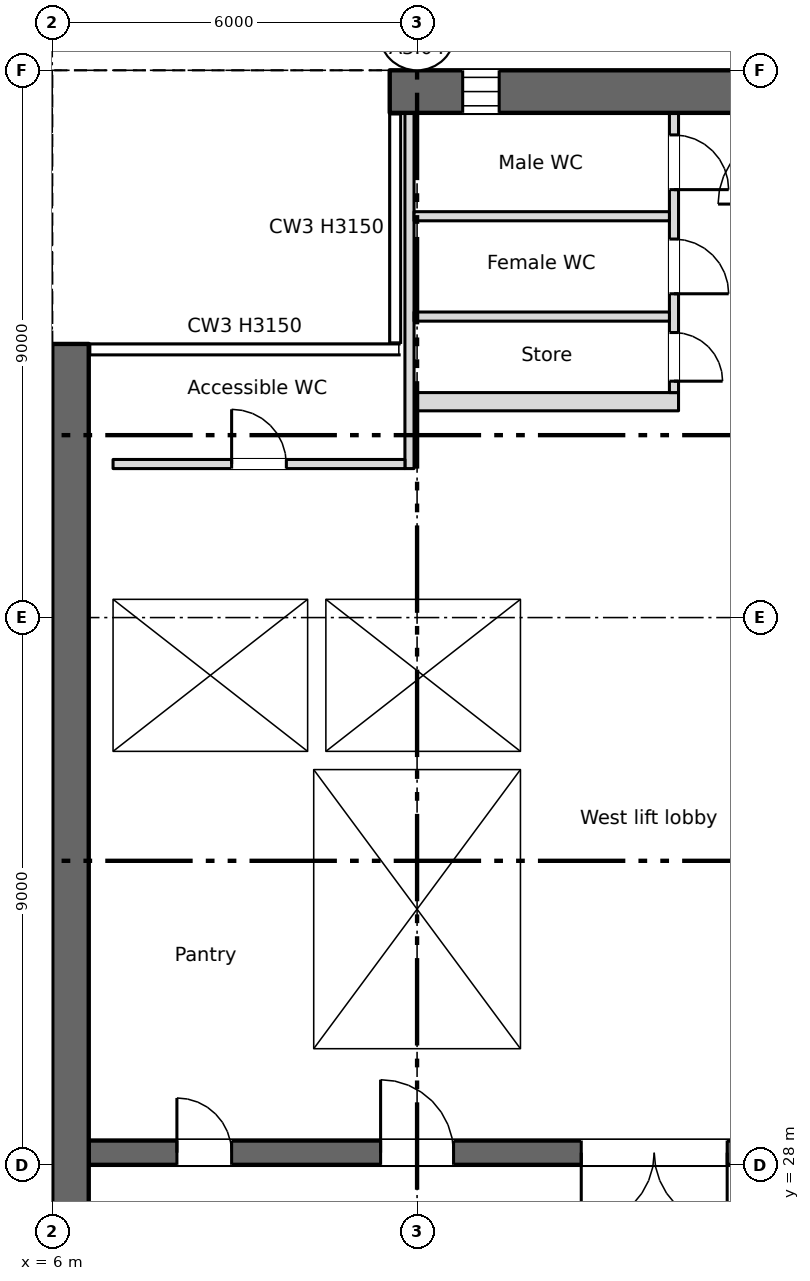
"""IFC4 building model, lengths in metres.
Left out: names, types, materials, properties, quantities, classifications, styles, units other than length and angle.
Written with IfcOpenShell. Run it as: python <this file> out.ifc"""

import sys

from ifc_helpers import new_model, si_unit, direction, frame, frame_2d, origin, place, context, subcontext, project, spatial, rectangle, extrude, element, fill, save


model = new_model("IFC4")
c1 = context("Model", 3, precision=1e-05, world=origin(), true_north=direction((0.0, 1.0)))
c2 = subcontext(c1, "Body", "Model", "MODEL_VIEW")
j1 = project(units=[si_unit("LENGTHUNIT", "METRE"), si_unit("PLANEANGLEUNIT", "RADIAN")], contexts=[c1])
p1 = place(None, origin())
s1 = spatial("IfcSite", under=j1, at=p1, CompositionType="ELEMENT")
p2 = place(p1, origin())
s2 = spatial("IfcBuilding", under=s1, at=p2, CompositionType="ELEMENT")
p3 = place(p2, frame((0.0, 0.0, 223.0)))
s3 = spatial("IfcBuildingStorey", under=s2, at=p3, CompositionType="ELEMENT", Elevation=223.0)
p4 = place(p3, frame((6.3, 7.5, 0.0), z_axis=(0.0, 0.0, 1.0), x_axis=(0.0, 1.0, 0.0)))
e1 = element("IfcWall", 1, at=p4, inside=s3, PredefinedType="SHEAR", context=c2, shape_type="SweptSolid", body=[
    extrude(rectangle(XDim=34.0, YDim=0.6, at=frame_2d((17.0, 0.0))), origin(), (0.0, 0.0, 1.0), 3.15),
])
p5 = place(p4, frame((1.2, 0.0, 0.6)))
e2 = element("IfcOpeningElement", 2, at=p5, cuts=e1, PredefinedType="OPENING", context=c2, shape_type="SweptSolid", body=[
    extrude(rectangle(XDim=0.6, YDim=2.4, at=frame_2d((0.3, 1.2))), frame((0.0, 0.31, 0.0), z_axis=(0.0, -1.0, 0.0), x_axis=(1.0, 0.0, 0.0)), (0.0, 0.0, 1.0), 0.62),
])
p6 = place(p4, frame((7.2, 0.0, 0.6)))
e3 = element("IfcOpeningElement", 3, at=p6, cuts=e1, PredefinedType="OPENING", context=c2, shape_type="SweptSolid", body=[
    extrude(rectangle(XDim=0.6, YDim=2.4, at=frame_2d((0.3, 1.2))), frame((0.0, 0.31, 0.0), z_axis=(0.0, -1.0, 0.0), x_axis=(1.0, 0.0, 0.0)), (0.0, 0.0, 1.0), 0.62),
])
p7 = place(p4, frame((13.2, 0.0, 0.6)))
e4 = element("IfcOpeningElement", 4, at=p7, cuts=e1, PredefinedType="OPENING", context=c2, shape_type="SweptSolid", body=[
    extrude(rectangle(XDim=0.6, YDim=2.4, at=frame_2d((0.3, 1.2))), frame((0.0, 0.31, 0.0), z_axis=(0.0, -1.0, 0.0), x_axis=(1.0, 0.0, 0.0)), (0.0, 0.0, 1.0), 0.62),
])
p8 = place(p4, frame((19.2, 0.0, 0.6)))
e5 = element("IfcOpeningElement", 5, at=p8, cuts=e1, PredefinedType="OPENING", context=c2, shape_type="SweptSolid", body=[
    extrude(rectangle(XDim=0.6, YDim=2.4, at=frame_2d((0.3, 1.2))), frame((0.0, 0.31, 0.0), z_axis=(0.0, -1.0, 0.0), x_axis=(1.0, 0.0, 0.0)), (0.0, 0.0, 1.0), 0.62),
])
p9 = place(p3, frame((11.55, 45.65, 0.0), z_axis=(0.0, 0.0, 1.0), x_axis=(1.0, 0.0, 0.0)))
e6 = element("IfcWall", 6, at=p9, inside=s3, PredefinedType="SHEAR", context=c2, shape_type="SweptSolid", body=[
    extrude(rectangle(XDim=54.9, YDim=0.7, at=frame_2d((27.45, 0.0))), origin(), (0.0, 0.0, 1.0), 3.15),
])
p10 = place(p9, frame((1.2, 0.0, 0.6)))
e7 = element("IfcOpeningElement", 7, at=p10, cuts=e6, PredefinedType="OPENING", context=c2, shape_type="SweptSolid", body=[
    extrude(rectangle(XDim=0.6, YDim=2.4, at=frame_2d((0.3, 1.2))), frame((0.0, 0.36, 0.0), z_axis=(0.0, -1.0, 0.0), x_axis=(1.0, 0.0, 0.0)), (0.0, 0.0, 1.0), 0.72),
])
p11 = place(p3, frame((6.6, 28.2, 0.0), z_axis=(0.0, 0.0, 1.0), x_axis=(1.0, 0.0, 0.0)))
e8 = element("IfcWall", 8, at=p11, inside=s3, PredefinedType="SHEAR", context=c2, shape_type="SweptSolid", body=[
    extrude(rectangle(XDim=57.9, YDim=0.4, at=frame_2d((28.95, 0.0))), origin(), (0.0, 0.0, 1.0), 3.15),
])
p12 = place(p11, frame((12.163, 0.0, 0.0)))
e9 = element("IfcOpeningElement", 9, at=p12, cuts=e8, PredefinedType="OPENING", context=c2, shape_type="SweptSolid", body=[
    extrude(rectangle(XDim=0.9, YDim=2.1, at=frame_2d((0.45, 1.05))), frame((0.0, 0.21, 0.0), z_axis=(0.0, -1.0, 0.0), x_axis=(1.0, 0.0, 0.0)), (0.0, 0.0, 1.0), 0.42),
])
p13 = place(p11, frame((14.738, 0.0, 0.0)))
e10 = element("IfcOpeningElement", 10, at=p13, cuts=e8, PredefinedType="OPENING", context=c2, shape_type="SweptSolid", body=[
    extrude(rectangle(XDim=0.9, YDim=2.1, at=frame_2d((0.45, 1.05))), frame((0.0, 0.21, 0.0), z_axis=(0.0, -1.0, 0.0), x_axis=(1.0, 0.0, 0.0)), (0.0, 0.0, 1.0), 0.42),
])
p14 = place(p11, frame((49.163, 0.0, 0.0)))
e11 = element("IfcOpeningElement", 11, at=p14, cuts=e8, PredefinedType="OPENING", context=c2, shape_type="SweptSolid", body=[
    extrude(rectangle(XDim=0.9, YDim=2.1, at=frame_2d((0.45, 1.05))), frame((0.0, 0.21, 0.0), z_axis=(0.0, -1.0, 0.0), x_axis=(1.0, 0.0, 0.0)), (0.0, 0.0, 1.0), 0.42),
])
p15 = place(p11, frame((51.738, 0.0, 0.0)))
e12 = element("IfcOpeningElement", 12, at=p15, cuts=e8, PredefinedType="OPENING", context=c2, shape_type="SweptSolid", body=[
    extrude(rectangle(XDim=0.9, YDim=2.1, at=frame_2d((0.45, 1.05))), frame((0.0, 0.21, 0.0), z_axis=(0.0, -1.0, 0.0), x_axis=(1.0, 0.0, 0.0)), (0.0, 0.0, 1.0), 0.42),
])
p16 = place(p11, frame((1.45, 0.0, 0.0)))
e13 = element("IfcOpeningElement", 13, at=p16, cuts=e8, PredefinedType="OPENING", context=c2, shape_type="SweptSolid", body=[
    extrude(rectangle(XDim=0.9, YDim=2.1, at=frame_2d((0.45, 1.05))), frame((0.0, 0.21, 0.0), z_axis=(0.0, -1.0, 0.0), x_axis=(1.0, 0.0, 0.0)), (0.0, 0.0, 1.0), 0.42),
])
p17 = place(p11, frame((4.8, 0.0, 0.0)))
e14 = element("IfcOpeningElement", 14, at=p17, cuts=e8, PredefinedType="OPENING", context=c2, shape_type="SweptSolid", body=[
    extrude(rectangle(XDim=1.2, YDim=2.1, at=frame_2d((0.6, 1.05))), frame((0.0, 0.21, 0.0), z_axis=(0.0, -1.0, 0.0), x_axis=(1.0, 0.0, 0.0)), (0.0, 0.0, 1.0), 0.42),
])
p18 = place(p11, frame((31.8, 0.0, 0.0)))
e15 = element("IfcOpeningElement", 15, at=p18, cuts=e8, PredefinedType="OPENING", context=c2, shape_type="SweptSolid", body=[
    extrude(rectangle(XDim=1.2, YDim=2.1, at=frame_2d((0.6, 1.05))), frame((0.0, 0.21, 0.0), z_axis=(0.0, -1.0, 0.0), x_axis=(1.0, 0.0, 0.0)), (0.0, 0.0, 1.0), 0.42),
])
p19 = place(p11, frame((55.3, 0.0, 0.0)))
e16 = element("IfcOpeningElement", 16, at=p19, cuts=e8, PredefinedType="OPENING", context=c2, shape_type="SweptSolid", body=[
    extrude(rectangle(XDim=1.2, YDim=2.1, at=frame_2d((0.6, 1.05))), frame((0.0, 0.21, 0.0), z_axis=(0.0, -1.0, 0.0), x_axis=(1.0, 0.0, 0.0)), (0.0, 0.0, 1.0), 0.42),
])
p20 = place(p11, frame((21.8, 0.0, 0.0)))
e17 = element("IfcOpeningElement", 17, at=p20, cuts=e8, PredefinedType="OPENING", context=c2, shape_type="SweptSolid", body=[
    extrude(rectangle(XDim=1.2, YDim=2.1, at=frame_2d((0.6, 1.05))), frame((0.0, 0.21, 0.0), z_axis=(0.0, -1.0, 0.0), x_axis=(1.0, 0.0, 0.0)), (0.0, 0.0, 1.0), 0.42),
])
p21 = place(p11, frame((41.8, 0.0, 0.0)))
e18 = element("IfcOpeningElement", 18, at=p21, cuts=e8, PredefinedType="OPENING", context=c2, shape_type="SweptSolid", body=[
    extrude(rectangle(XDim=1.2, YDim=2.1, at=frame_2d((0.6, 1.05))), frame((0.0, 0.21, 0.0), z_axis=(0.0, -1.0, 0.0), x_axis=(1.0, 0.0, 0.0)), (0.0, 0.0, 1.0), 0.42),
])
p22 = place(p11, frame((24.95, 0.0, 0.0)))
e19 = element("IfcOpeningElement", 19, at=p22, cuts=e8, PredefinedType="OPENING", context=c2, shape_type="SweptSolid", body=[
    extrude(rectangle(XDim=2.4, YDim=2.1, at=frame_2d((1.2, 1.05))), frame((0.0, 0.21, 0.0), z_axis=(0.0, -1.0, 0.0), x_axis=(1.0, 0.0, 0.0)), (0.0, 0.0, 1.0), 0.42),
])
p23 = place(p11, frame((37.45, 0.0, 0.0)))
e20 = element("IfcOpeningElement", 20, at=p23, cuts=e8, PredefinedType="OPENING", context=c2, shape_type="SweptSolid", body=[
    extrude(rectangle(XDim=2.4, YDim=2.1, at=frame_2d((1.2, 1.05))), frame((0.0, 0.21, 0.0), z_axis=(0.0, -1.0, 0.0), x_axis=(1.0, 0.0, 0.0)), (0.0, 0.0, 1.0), 0.42),
])
p24 = place(p11, frame((8.1, 0.0, 0.0)))
e21 = element("IfcOpeningElement", 21, at=p24, cuts=e8, PredefinedType="OPENING", context=c2, shape_type="SweptSolid", body=[
    extrude(rectangle(XDim=2.4, YDim=2.1, at=frame_2d((1.2, 1.05))), frame((0.0, 0.21, 0.0), z_axis=(0.0, -1.0, 0.0), x_axis=(1.0, 0.0, 0.0)), (0.0, 0.0, 1.0), 0.42),
])
p25 = place(p11, frame((28.95, 0.0, 0.0)))
e22 = element("IfcOpeningElement", 22, at=p25, cuts=e8, PredefinedType="OPENING", context=c2, shape_type="SweptSolid", body=[
    extrude(rectangle(XDim=0.9, YDim=2.1, at=frame_2d((0.45, 1.05))), frame((0.0, 0.21, 0.0), z_axis=(0.0, -1.0, 0.0), x_axis=(1.0, 0.0, 0.0)), (0.0, 0.0, 1.0), 0.42),
])
p26 = place(p11, frame((34.95, 0.0, 0.0)))
e23 = element("IfcOpeningElement", 23, at=p26, cuts=e8, PredefinedType="OPENING", context=c2, shape_type="SweptSolid", body=[
    extrude(rectangle(XDim=0.9, YDim=2.1, at=frame_2d((0.45, 1.05))), frame((0.0, 0.21, 0.0), z_axis=(0.0, -1.0, 0.0), x_axis=(1.0, 0.0, 0.0)), (0.0, 0.0, 1.0), 0.42),
])
p27 = place(p3, frame((6.8, 28.4, 0.0), z_axis=(0.0, 0.0, 1.0), x_axis=(0.0, 1.0, 0.0)))
e24 = element("IfcWall", 24, at=p27, inside=s3, PredefinedType="SHEAR", context=c2, shape_type="SweptSolid", body=[
    extrude(rectangle(XDim=12.85, YDim=0.4, at=frame_2d((6.425, 0.0))), origin(), (0.0, 0.0, 1.0), 3.15),
])
for number, where, z_axis, x_axis in (
    (25, (10.15, 28.4, 0.0), (0.0, 0.0, 1.0), (0.0, 1.0, 0.0)),
    (26, (13.85, 28.4, 0.0), (0.0, 0.0, 1.0), (0.0, 1.0, 0.0)),
):
    element("IfcWall", number, at=place(p3, frame(where, z_axis=z_axis, x_axis=x_axis)), inside=s3, PredefinedType="SHEAR", context=c2, shape_type="SweptSolid", body=[
        extrude(rectangle(XDim=6.1, YDim=0.3, at=frame_2d((3.05, 0.0))), origin(), (0.0, 0.0, 1.0), 3.15),
    ])
for number, where, z_axis, x_axis in (
    (27, (7.0, 34.65, 0.0), (0.0, 0.0, 1.0), (1.0, 0.0, 0.0)),
    (28, (7.0, 37.45, 0.0), (0.0, 0.0, 1.0), (1.0, 0.0, 0.0)),
):
    element("IfcWall", number, at=place(p3, frame(where, z_axis=z_axis, x_axis=x_axis)), inside=s3, PredefinedType="SHEAR", context=c2, shape_type="SweptSolid", body=[
        extrude(rectangle(XDim=7.0, YDim=0.3, at=frame_2d((3.5, 0.0))), origin(), (0.0, 0.0, 1.0), 3.15),
    ])
p28 = place(p3, frame((13.85, 34.8, 0.0), z_axis=(0.0, 0.0, 1.0), x_axis=(0.0, 1.0, 0.0)))
e29 = element("IfcWall", 29, at=p28, inside=s3, PredefinedType="SHEAR", context=c2, shape_type="SweptSolid", body=[
    extrude(rectangle(XDim=2.5, YDim=0.3, at=frame_2d((1.25, 0.0))), origin(), (0.0, 0.0, 1.0), 3.15),
])
p29 = place(p3, frame((11.95, 40.55, 0.0), z_axis=(0.0, 0.0, 1.0), x_axis=(1.0, 0.0, 0.0)))
e30 = element("IfcWall", 30, at=p29, inside=s3, PredefinedType="PARTITIONING", context=c2, shape_type="SweptSolid", body=[
    extrude(rectangle(XDim=4.35, YDim=0.3, at=frame_2d((2.175, 0.0))), origin(), (0.0, 0.0, 1.0), 3.15),
])
p30 = place(p3, frame((10.35, 34.8, 0.0), z_axis=(0.0, 0.0, 1.0), x_axis=(0.0, 1.0, 0.0)))
e31 = element("IfcWall", 31, at=p30, inside=s3, PredefinedType="SHEAR", context=c2, shape_type="SweptSolid", body=[
    extrude(rectangle(XDim=2.5, YDim=0.3, at=frame_2d((1.25, 0.0))), origin(), (0.0, 0.0, 1.0), 3.15),
])
p31 = place(p3, frame((16.225, 45.3, 0.0), z_axis=(0.0, 0.0, 1.0), x_axis=(0.0, -1.0, 0.0)))
e32 = element("IfcWall", 32, at=p31, inside=s3, PredefinedType="PARTITIONING", context=c2, shape_type="SweptSolid", body=[
    extrude(rectangle(XDim=4.6, YDim=0.15, at=frame_2d((2.3, 0.0))), origin(), (0.0, 0.0, 1.0), 3.15),
])
p32 = place(p31, frame((3.613, 0.0, 0.0)))
e33 = element("IfcOpeningElement", 33, at=p32, cuts=e32, PredefinedType="OPENING", context=c2, shape_type="SweptSolid", body=[
    extrude(rectangle(XDim=0.8, YDim=2.1, at=frame_2d((0.4, 1.05))), frame((0.0, 0.085, 0.0), z_axis=(0.0, -1.0, 0.0), x_axis=(1.0, 0.0, 0.0)), (0.0, 0.0, 1.0), 0.17),
])
p33 = place(p31, frame((2.075, 0.0, 0.0)))
e34 = element("IfcOpeningElement", 34, at=p33, cuts=e32, PredefinedType="OPENING", context=c2, shape_type="SweptSolid", body=[
    extrude(rectangle(XDim=0.9, YDim=2.1, at=frame_2d((0.45, 1.05))), frame((0.0, 0.085, 0.0), z_axis=(0.0, -1.0, 0.0), x_axis=(1.0, 0.0, 0.0)), (0.0, 0.0, 1.0), 0.17),
])
p34 = place(p31, frame((0.363, 0.0, 0.0)))
e35 = element("IfcOpeningElement", 35, at=p34, cuts=e32, PredefinedType="OPENING", context=c2, shape_type="SweptSolid", body=[
    extrude(rectangle(XDim=0.9, YDim=2.1, at=frame_2d((0.45, 1.05))), frame((0.0, 0.085, 0.0), z_axis=(0.0, -1.0, 0.0), x_axis=(1.0, 0.0, 0.0)), (0.0, 0.0, 1.0), 0.17),
])
p35 = place(p3, frame((11.875, 39.45, 0.0), z_axis=(0.0, 0.0, 1.0), x_axis=(0.0, 1.0, 0.0)))
e36 = element("IfcWall", 36, at=p35, inside=s3, PredefinedType="PARTITIONING", context=c2, shape_type="SweptSolid", body=[
    extrude(rectangle(XDim=5.85, YDim=0.15, at=frame_2d((2.925, 0.0))), origin(), (0.0, 0.0, 1.0), 3.15),
])
p36 = place(p3, frame((7.0, 39.525, 0.0), z_axis=(0.0, 0.0, 1.0), x_axis=(1.0, 0.0, 0.0)))
e37 = element("IfcWall", 37, at=p36, inside=s3, PredefinedType="PARTITIONING", context=c2, shape_type="SweptSolid", body=[
    extrude(rectangle(XDim=4.8, YDim=0.15, at=frame_2d((2.4, 0.0))), origin(), (0.0, 0.0, 1.0), 3.15),
])
p37 = place(p36, frame((1.95, 0.0, 0.0)))
e38 = element("IfcOpeningElement", 38, at=p37, cuts=e37, PredefinedType="OPENING", context=c2, shape_type="SweptSolid", body=[
    extrude(rectangle(XDim=0.9, YDim=2.1, at=frame_2d((0.45, 1.05))), frame((0.0, 0.085, 0.0), z_axis=(0.0, -1.0, 0.0), x_axis=(1.0, 0.0, 0.0)), (0.0, 0.0, 1.0), 0.17),
])
for number, where, z_axis, x_axis in (
    (39, (11.95, 41.95, 0.0), (0.0, 0.0, 1.0), (1.0, 0.0, 0.0)),
    (40, (11.95, 43.6, 0.0), (0.0, 0.0, 1.0), (1.0, 0.0, 0.0)),
):
    element("IfcWall", number, at=place(p3, frame(where, z_axis=z_axis, x_axis=x_axis)), inside=s3, PredefinedType="PARTITIONING", context=c2, shape_type="SweptSolid", body=[
        extrude(rectangle(XDim=4.2, YDim=0.15, at=frame_2d((2.1, 0.0))), origin(), (0.0, 0.0, 1.0), 3.15),
    ])
p38 = place(p10, origin())
e41 = element("IfcWindow", 41, at=p38, inside=s3, PartitioningType="SINGLE_PANEL", PredefinedType="WINDOW", context=c2, shape_type="SweptSolid", body=[
    extrude(rectangle(XDim=0.6, YDim=2.4, at=frame_2d((0.3, 1.2))), frame((0.0, 0.03, 0.0), z_axis=(0.0, -1.0, 0.0), x_axis=(1.0, 0.0, 0.0)), (0.0, 0.0, 1.0), 0.06),
])
fill(e7, e41)
p39 = place(p16, origin())
e42 = element("IfcDoor", 42, at=p39, inside=s3, OperationType="SINGLE_SWING_LEFT", PredefinedType="DOOR", context=c2, shape_type="SweptSolid", body=[
    extrude(rectangle(XDim=0.9, YDim=2.1, at=frame_2d((0.45, 1.05))), frame((0.0, 0.025, 0.0), z_axis=(0.0, -1.0, 0.0), x_axis=(1.0, 0.0, 0.0)), (0.0, 0.0, 1.0), 0.05),
])
fill(e13, e42)
p40 = place(p37, origin())
e43 = element("IfcDoor", 43, at=p40, inside=s3, OperationType="SINGLE_SWING_LEFT", PredefinedType="DOOR", context=c2, shape_type="SweptSolid", body=[
    extrude(rectangle(XDim=0.9, YDim=2.1, at=frame_2d((0.45, 1.05))), frame((0.0, 0.025, 0.0), z_axis=(0.0, -1.0, 0.0), x_axis=(1.0, 0.0, 0.0)), (0.0, 0.0, 1.0), 0.05),
])
fill(e38, e43)
p41 = place(p32, origin())
e44 = element("IfcDoor", 44, at=p41, inside=s3, OperationType="SINGLE_SWING_RIGHT", PredefinedType="DOOR", context=c2, shape_type="SweptSolid", body=[
    extrude(rectangle(XDim=0.8, YDim=2.1, at=frame_2d((0.4, 1.05))), frame((0.0, 0.025, 0.0), z_axis=(0.0, -1.0, 0.0), x_axis=(1.0, 0.0, 0.0)), (0.0, 0.0, 1.0), 0.05),
])
fill(e33, e44)
p42 = place(p33, origin())
e45 = element("IfcDoor", 45, at=p42, inside=s3, OperationType="SINGLE_SWING_RIGHT", PredefinedType="DOOR", context=c2, shape_type="SweptSolid", body=[
    extrude(rectangle(XDim=0.9, YDim=2.1, at=frame_2d((0.45, 1.05))), frame((0.0, 0.025, 0.0), z_axis=(0.0, -1.0, 0.0), x_axis=(1.0, 0.0, 0.0)), (0.0, 0.0, 1.0), 0.05),
])
fill(e34, e45)
p43 = place(p34, origin())
e46 = element("IfcDoor", 46, at=p43, inside=s3, OperationType="SINGLE_SWING_RIGHT", PredefinedType="DOOR", context=c2, shape_type="SweptSolid", body=[
    extrude(rectangle(XDim=0.9, YDim=2.1, at=frame_2d((0.45, 1.05))), frame((0.0, 0.025, 0.0), z_axis=(0.0, -1.0, 0.0), x_axis=(1.0, 0.0, 0.0)), (0.0, 0.0, 1.0), 0.05),
])
fill(e35, e46)
p44 = place(p17, origin())
e47 = element("IfcDoor", 47, at=p44, inside=s3, OperationType="SINGLE_SWING_LEFT", PredefinedType="DOOR", context=c2, shape_type="SweptSolid", body=[
    extrude(rectangle(XDim=1.2, YDim=2.1, at=frame_2d((0.6, 1.05))), frame((0.0, 0.025, 0.0), z_axis=(0.0, -1.0, 0.0), x_axis=(1.0, 0.0, 0.0)), (0.0, 0.0, 1.0), 0.05),
])
fill(e14, e47)
p45 = place(p24, origin())
e48 = element("IfcDoor", 48, at=p45, inside=s3, OperationType="DOUBLE_DOOR_SINGLE_SWING", PredefinedType="DOOR", context=c2, shape_type="SweptSolid", body=[
    extrude(rectangle(XDim=2.4, YDim=2.1, at=frame_2d((1.2, 1.05))), frame((0.0, 0.025, 0.0), z_axis=(0.0, -1.0, 0.0), x_axis=(1.0, 0.0, 0.0)), (0.0, 0.0, 1.0), 0.05),
])
fill(e21, e48)
save(model, sys.argv[1])
